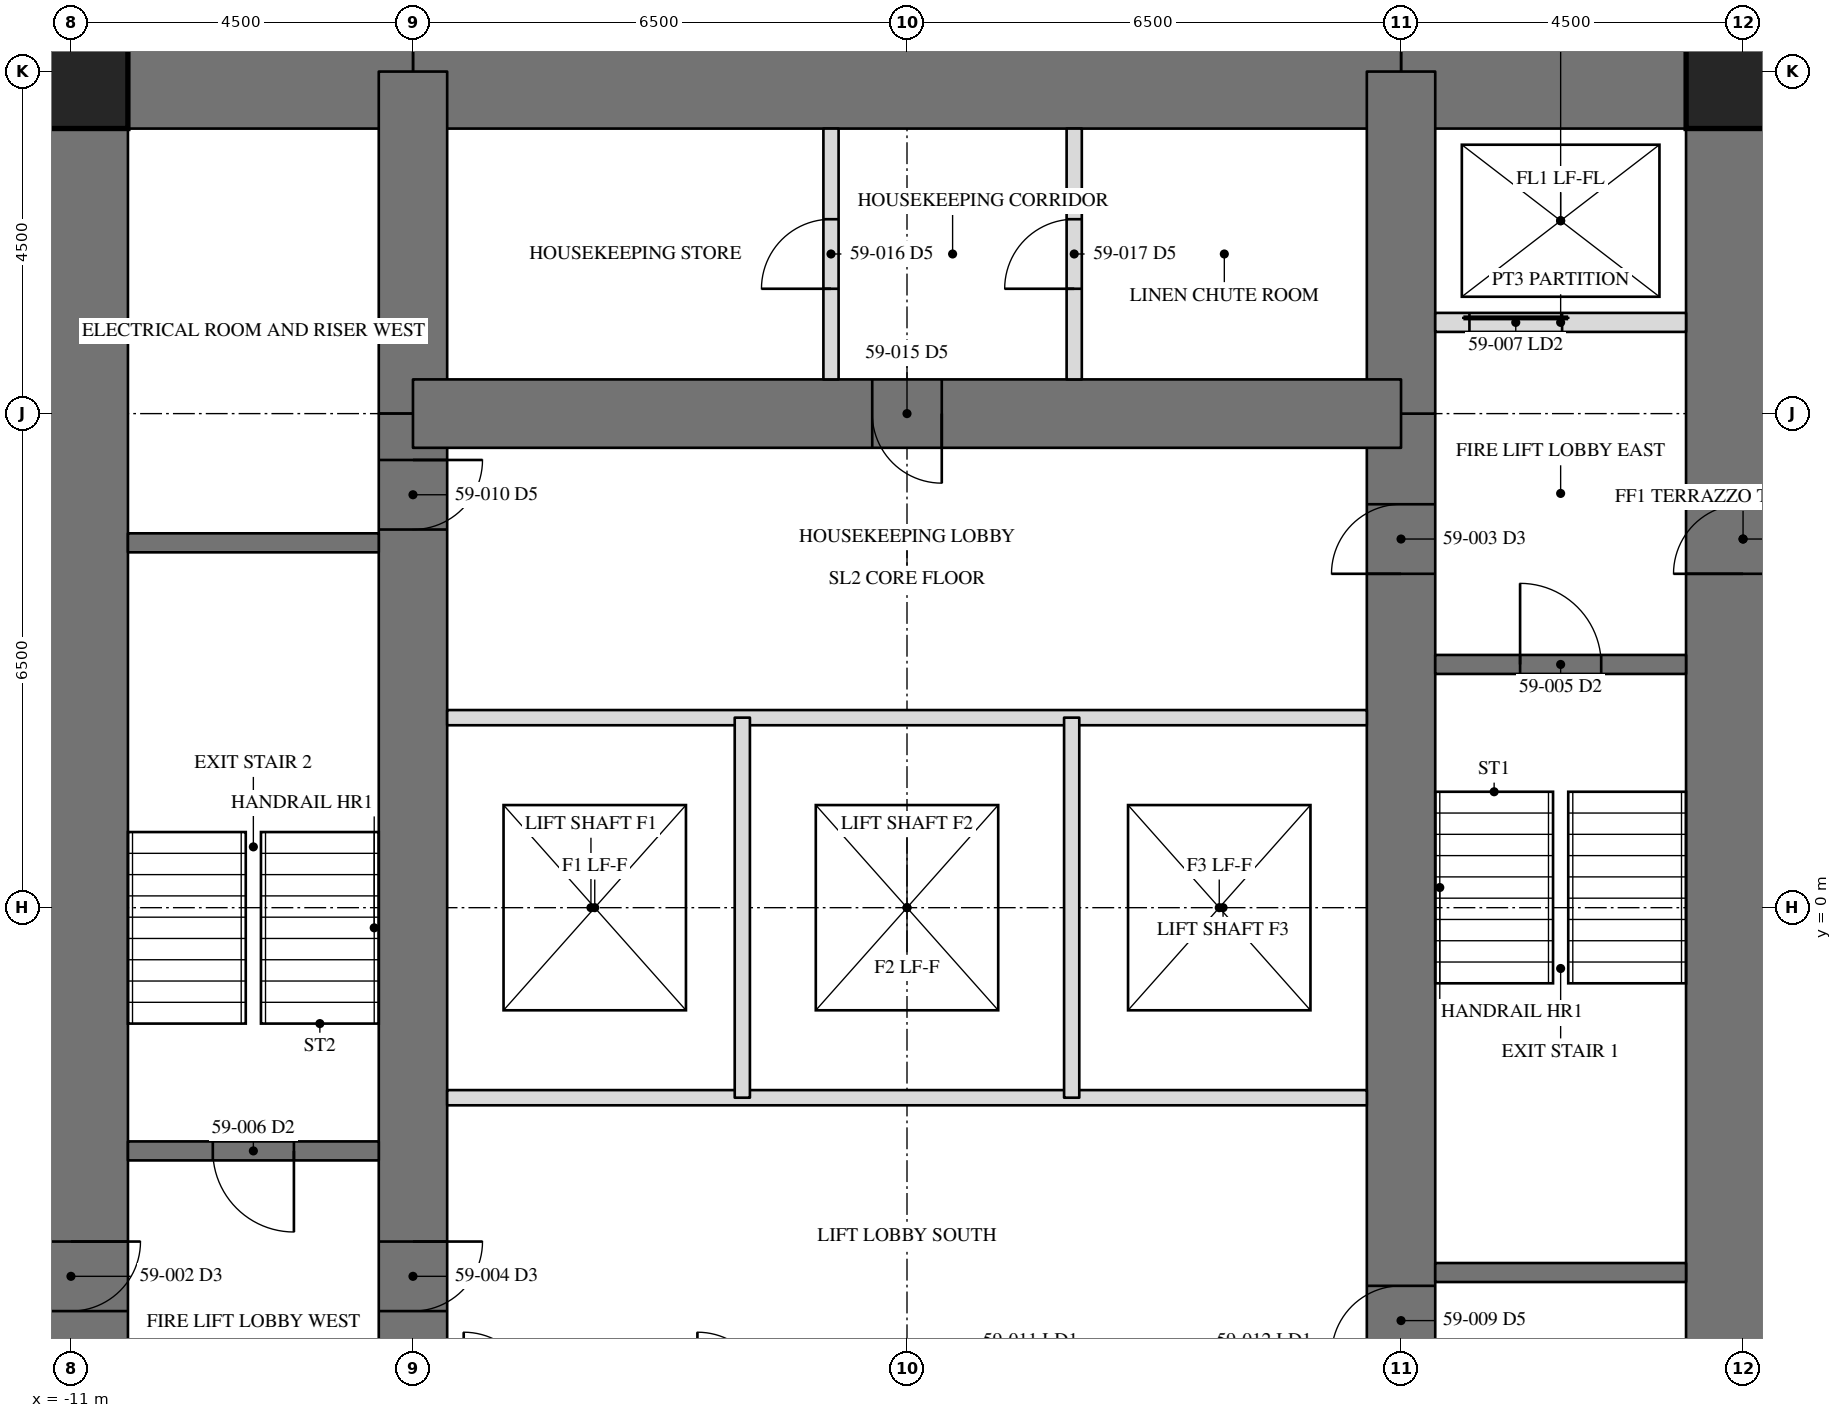
"""IFC4 building model, lengths in metres.
Left out: names, types, materials, properties, quantities, classifications, styles, units other than length and angle.
Written with IfcOpenShell. Run it as: python <this file> out.ifc"""

import sys

from ifc_helpers import new_model, si_unit, direction, frame, frame_2d, origin, origin_2d, place, context, subcontext, project, spatial, rectangle, hollow_rectangle, extrude, element, fill, save


model = new_model("IFC4")
c1 = context("Model", 3, precision=1e-05, world=origin(), true_north=direction((0.0, 1.0)))
c2 = subcontext(c1, "Body", "Model", "MODEL_VIEW")
j1 = project(units=[si_unit("LENGTHUNIT", "METRE"), si_unit("PLANEANGLEUNIT", "RADIAN")], contexts=[c1])
p1 = place(None, origin())
s1 = spatial("IfcSite", under=j1, at=p1, CompositionType="ELEMENT")
p2 = place(p1, origin())
s2 = spatial("IfcBuilding", under=s1, at=p2, CompositionType="ELEMENT")
p3 = place(p2, frame((0.0, 0.0, 243.2)))
s3 = spatial("IfcBuildingStorey", under=s2, at=p3, CompositionType="ELEMENT", Elevation=243.2)
p4 = place(p3, frame((11.0, -11.0, 0.0), z_axis=(0.0, 0.0, 1.0), x_axis=(0.0, 1.0, 0.0)))
e1 = element("IfcWall", 1, at=p4, inside=s3, PredefinedType="SHEAR", context=c2, shape_type="SweptSolid", body=[
    extrude(rectangle(XDim=22.0, YDim=1.5, at=frame_2d((11.0, 0.0))), origin(), (0.0, 0.0, 1.0), 3.5),
])
p5 = place(p4, frame((15.393, 0.0, 0.0)))
e2 = element("IfcOpeningElement", 2, at=p5, cuts=e1, PredefinedType="OPENING", context=c2, shape_type="SweptSolid", body=[
    extrude(rectangle(XDim=0.915, YDim=2.134, at=frame_2d((0.458, 1.067))), frame((0.0, 0.76, 0.0), z_axis=(0.0, -1.0, 0.0), x_axis=(1.0, 0.0, 0.0)), (0.0, 0.0, 1.0), 1.52),
])
p6 = place(p3, frame((-11.0, 11.0, 0.0), z_axis=(0.0, 0.0, 1.0), x_axis=(0.0, -1.0, 0.0)))
e3 = element("IfcWall", 3, at=p6, inside=s3, PredefinedType="SHEAR", context=c2, shape_type="SweptSolid", body=[
    extrude(rectangle(XDim=22.0, YDim=1.5, at=frame_2d((11.0, 0.0))), origin(), (0.0, 0.0, 1.0), 3.5),
])
p7 = place(p6, frame((15.393, 0.0, 0.0)))
e4 = element("IfcOpeningElement", 4, at=p7, cuts=e3, PredefinedType="OPENING", context=c2, shape_type="SweptSolid", body=[
    extrude(rectangle(XDim=0.915, YDim=2.134, at=frame_2d((0.458, 1.067))), frame((0.0, 0.76, 0.0), z_axis=(0.0, -1.0, 0.0), x_axis=(1.0, 0.0, 0.0)), (0.0, 0.0, 1.0), 1.52),
])
p8 = place(p3, frame((11.0, 11.0, 0.0), z_axis=(0.0, 0.0, 1.0), x_axis=(-1.0, 0.0, 0.0)))
e5 = element("IfcWall", 5, at=p8, inside=s3, PredefinedType="SHEAR", context=c2, shape_type="SweptSolid", body=[
    extrude(rectangle(XDim=4.5, YDim=1.5, at=frame_2d((2.25, 0.0))), origin(), (0.0, 0.0, 1.0), 3.5),
])
p9 = place(p3, frame((6.5, 11.0, 0.0), z_axis=(0.0, 0.0, 1.0), x_axis=(-1.0, 0.0, 0.0)))
e6 = element("IfcWall", 6, at=p9, inside=s3, PredefinedType="SHEAR", context=c2, shape_type="SweptSolid", body=[
    extrude(rectangle(XDim=13.0, YDim=1.5, at=frame_2d((6.5, 0.0))), origin(), (0.0, 0.0, 1.0), 3.5),
])
p10 = place(p3, frame((-6.5, 11.0, 0.0), z_axis=(0.0, 0.0, 1.0), x_axis=(-1.0, 0.0, 0.0)))
e7 = element("IfcWall", 7, at=p10, inside=s3, PredefinedType="SHEAR", context=c2, shape_type="SweptSolid", body=[
    extrude(rectangle(XDim=4.5, YDim=1.5, at=frame_2d((2.25, 0.0))), origin(), (0.0, 0.0, 1.0), 3.5),
])
p11 = place(p3, frame((6.5, -6.5, 0.0), z_axis=(0.0, 0.0, 1.0), x_axis=(0.0, 1.0, 0.0)))
e8 = element("IfcWall", 8, at=p11, inside=s3, PredefinedType="SHEAR", context=c2, shape_type="SweptSolid", body=[
    extrude(rectangle(XDim=13.0, YDim=0.9, at=frame_2d((6.5, 0.0))), origin(), (0.0, 0.0, 1.0), 3.5),
])
p12 = place(p11, frame((10.893, 0.0, 0.0)))
e9 = element("IfcOpeningElement", 9, at=p12, cuts=e8, PredefinedType="OPENING", context=c2, shape_type="SweptSolid", body=[
    extrude(rectangle(XDim=0.915, YDim=2.134, at=frame_2d((0.458, 1.067))), frame((0.0, 0.46, 0.0), z_axis=(0.0, -1.0, 0.0), x_axis=(1.0, 0.0, 0.0)), (0.0, 0.0, 1.0), 0.92),
])
p13 = place(p11, frame((0.61, 0.0, 0.0)))
e10 = element("IfcOpeningElement", 10, at=p13, cuts=e8, PredefinedType="OPENING", context=c2, shape_type="SweptSolid", body=[
    extrude(rectangle(XDim=0.915, YDim=2.134, at=frame_2d((0.458, 1.067))), frame((0.0, 0.46, 0.0), z_axis=(0.0, -1.0, 0.0), x_axis=(1.0, 0.0, 0.0)), (0.0, 0.0, 1.0), 0.92),
])
for number, where, z_axis, x_axis in (
    (11, (6.5, 6.5, 0.0), (0.0, 0.0, 1.0), (0.0, 1.0, 0.0)),
    (12, (-6.5, 11.0, 0.0), (0.0, 0.0, 1.0), (0.0, -1.0, 0.0)),
):
    element("IfcWall", number, at=place(p3, frame(where, z_axis=z_axis, x_axis=x_axis)), inside=s3, PredefinedType="SHEAR", context=c2, shape_type="SweptSolid", body=[
        extrude(rectangle(XDim=4.5, YDim=0.9, at=frame_2d((2.25, 0.0))), origin(), (0.0, 0.0, 1.0), 3.5),
    ])
p14 = place(p3, frame((-6.5, 6.5, 0.0), z_axis=(0.0, 0.0, 1.0), x_axis=(0.0, -1.0, 0.0)))
e13 = element("IfcWall", 13, at=p14, inside=s3, PredefinedType="SHEAR", context=c2, shape_type="SweptSolid", body=[
    extrude(rectangle(XDim=13.0, YDim=0.9, at=frame_2d((6.5, 0.0))), origin(), (0.0, 0.0, 1.0), 3.5),
])
p15 = place(p14, frame((10.893, 0.0, 0.0)))
e14 = element("IfcOpeningElement", 14, at=p15, cuts=e13, PredefinedType="OPENING", context=c2, shape_type="SweptSolid", body=[
    extrude(rectangle(XDim=0.915, YDim=2.134, at=frame_2d((0.458, 1.067))), frame((0.0, 0.46, 0.0), z_axis=(0.0, -1.0, 0.0), x_axis=(1.0, 0.0, 0.0)), (0.0, 0.0, 1.0), 0.92),
])
p16 = place(p14, frame((0.61, 0.0, 0.0)))
e15 = element("IfcOpeningElement", 15, at=p16, cuts=e13, PredefinedType="OPENING", context=c2, shape_type="SweptSolid", body=[
    extrude(rectangle(XDim=0.915, YDim=2.134, at=frame_2d((0.458, 1.067))), frame((0.0, 0.46, 0.0), z_axis=(0.0, -1.0, 0.0), x_axis=(1.0, 0.0, 0.0)), (0.0, 0.0, 1.0), 0.92),
])
p17 = place(p3, frame((6.5, 6.5, 0.0), z_axis=(0.0, 0.0, 1.0), x_axis=(-1.0, 0.0, 0.0)))
e16 = element("IfcWall", 16, at=p17, inside=s3, PredefinedType="SHEAR", context=c2, shape_type="SweptSolid", body=[
    extrude(rectangle(XDim=13.0, YDim=0.9, at=frame_2d((6.5, 0.0))), origin(), (0.0, 0.0, 1.0), 3.5),
])
p18 = place(p17, frame((6.042, 0.0, 0.0)))
e17 = element("IfcOpeningElement", 17, at=p18, cuts=e16, PredefinedType="OPENING", context=c2, shape_type="SweptSolid", body=[
    extrude(rectangle(XDim=0.915, YDim=2.134, at=frame_2d((0.458, 1.067))), frame((0.0, 0.46, 0.0), z_axis=(0.0, -1.0, 0.0), x_axis=(1.0, 0.0, 0.0)), (0.0, 0.0, 1.0), 0.92),
])
for number, where, z_axis, x_axis in (
    (18, (11.0, 11.0, 0.0), (0.0, 0.0, 1.0), (1.0, 0.0, 0.0)),
    (19, (-11.0, 11.0, 0.0), (0.0, 0.0, 1.0), (1.0, 0.0, 0.0)),
):
    element("IfcColumn", number, at=place(p3, frame(where, z_axis=z_axis, x_axis=x_axis)), inside=s3, PredefinedType="COLUMN", context=c2, shape_type="SweptSolid", body=[
        extrude(hollow_rectangle(XDim=1.499, YDim=1.499, WallThickness=0.102, at=origin_2d()), origin(), (0.0, 0.0, 1.0), 3.5),
    ])
for number, where, z_axis, x_axis in (
    (20, (6.95, -4.8, 0.0), (0.0, 0.0, 1.0), (1.0, 0.0, 0.0)),
    (21, (-6.95, 4.8, 0.0), (0.0, 0.0, 1.0), (-1.0, 0.0, 0.0)),
):
    element("IfcWall", number, at=place(p3, frame(where, z_axis=z_axis, x_axis=x_axis)), inside=s3, PredefinedType="SOLIDWALL", context=c2, shape_type="SweptSolid", body=[
        extrude(rectangle(XDim=3.3, YDim=0.25, at=frame_2d((1.65, 0.0))), origin(), (0.0, 0.0, 1.0), 3.31),
    ])
p19 = place(p3, frame((6.95, 3.2, 0.0), z_axis=(0.0, 0.0, 1.0), x_axis=(1.0, 0.0, 0.0)))
e22 = element("IfcWall", 22, at=p19, inside=s3, PredefinedType="SOLIDWALL", context=c2, shape_type="SweptSolid", body=[
    extrude(rectangle(XDim=3.3, YDim=0.25, at=frame_2d((1.65, 0.0))), origin(), (0.0, 0.0, 1.0), 3.31),
])
p20 = place(p19, frame((1.116, 0.0, 0.0)))
e23 = element("IfcOpeningElement", 23, at=p20, cuts=e22, PredefinedType="OPENING", context=c2, shape_type="SweptSolid", body=[
    extrude(rectangle(XDim=1.067, YDim=2.134, at=frame_2d((0.533, 1.067))), frame((0.0, 0.135, 0.0), z_axis=(0.0, -1.0, 0.0), x_axis=(1.0, 0.0, 0.0)), (0.0, 0.0, 1.0), 0.27),
])
p21 = place(p3, frame((-6.95, -3.2, 0.0), z_axis=(0.0, 0.0, 1.0), x_axis=(-1.0, 0.0, 0.0)))
e24 = element("IfcWall", 24, at=p21, inside=s3, PredefinedType="SOLIDWALL", context=c2, shape_type="SweptSolid", body=[
    extrude(rectangle(XDim=3.3, YDim=0.25, at=frame_2d((1.65, 0.0))), origin(), (0.0, 0.0, 1.0), 3.31),
])
p22 = place(p21, frame((1.116, 0.0, 0.0)))
e25 = element("IfcOpeningElement", 25, at=p22, cuts=e24, PredefinedType="OPENING", context=c2, shape_type="SweptSolid", body=[
    extrude(rectangle(XDim=1.067, YDim=2.134, at=frame_2d((0.533, 1.067))), frame((0.0, 0.135, 0.0), z_axis=(0.0, -1.0, 0.0), x_axis=(1.0, 0.0, 0.0)), (0.0, 0.0, 1.0), 0.27),
])
p23 = place(p3, frame((6.95, 7.7, 0.0), z_axis=(0.0, 0.0, 1.0), x_axis=(1.0, 0.0, 0.0)))
e26 = element("IfcWall", 26, at=p23, inside=s3, PredefinedType="PARTITIONING", context=c2, shape_type="SweptSolid", body=[
    extrude(rectangle(XDim=3.3, YDim=0.25, at=frame_2d((1.65, 0.0))), origin(), (0.0, 0.0, 1.0), 3.31),
])
p24 = place(p23, frame((0.45, 0.0, 0.0)))
e27 = element("IfcOpeningElement", 27, at=p24, cuts=e26, PredefinedType="OPENING", context=c2, shape_type="SweptSolid", body=[
    extrude(rectangle(XDim=1.219, YDim=2.134, at=frame_2d((0.609, 1.067))), frame((0.0, 0.135, 0.0), z_axis=(0.0, -1.0, 0.0), x_axis=(1.0, 0.0, 0.0)), (0.0, 0.0, 1.0), 0.27),
])
for number, where, z_axis, x_axis in (
    (28, (-6.05, 2.5, 0.0), (0.0, 0.0, 1.0), (1.0, 0.0, 0.0)),
    (29, (6.05, -2.5, 0.0), (0.0, 0.0, 1.0), (-1.0, 0.0, 0.0)),
):
    element("IfcWall", number, at=place(p3, frame(where, z_axis=z_axis, x_axis=x_axis)), inside=s3, PredefinedType="PARTITIONING", context=c2, shape_type="SweptSolid", body=[
        extrude(rectangle(XDim=12.1, YDim=0.2, at=frame_2d((6.05, 0.0))), origin(), (0.0, 0.0, 1.0), 3.31),
    ])
for number, where, z_axis, x_axis in (
    (30, (-2.167, -2.5, 0.0), (0.0, 0.0, 1.0), (0.0, 1.0, 0.0)),
    (31, (2.167, -2.5, 0.0), (0.0, 0.0, 1.0), (0.0, 1.0, 0.0)),
):
    element("IfcWall", number, at=place(p3, frame(where, z_axis=z_axis, x_axis=x_axis)), inside=s3, PredefinedType="PARTITIONING", context=c2, shape_type="SweptSolid", body=[
        extrude(rectangle(XDim=5.0, YDim=0.2, at=frame_2d((2.5, 0.0))), origin(), (0.0, 0.0, 1.0), 3.31),
    ])
p25 = place(p3, frame((-1.0, 6.95, 0.0), z_axis=(0.0, 0.0, 1.0), x_axis=(0.0, 1.0, 0.0)))
e32 = element("IfcWall", 32, at=p25, inside=s3, PredefinedType="PARTITIONING", context=c2, shape_type="SweptSolid", body=[
    extrude(rectangle(XDim=3.3, YDim=0.2, at=frame_2d((1.65, 0.0))), origin(), (0.0, 0.0, 1.0), 3.31),
])
p26 = place(p25, frame((1.192, 0.0, 0.0)))
e33 = element("IfcOpeningElement", 33, at=p26, cuts=e32, PredefinedType="OPENING", context=c2, shape_type="SweptSolid", body=[
    extrude(rectangle(XDim=0.915, YDim=2.134, at=frame_2d((0.458, 1.067))), frame((0.0, 0.11, 0.0), z_axis=(0.0, -1.0, 0.0), x_axis=(1.0, 0.0, 0.0)), (0.0, 0.0, 1.0), 0.22),
])
p27 = place(p3, frame((2.2, 6.95, 0.0), z_axis=(0.0, 0.0, 1.0), x_axis=(0.0, 1.0, 0.0)))
e34 = element("IfcWall", 34, at=p27, inside=s3, PredefinedType="PARTITIONING", context=c2, shape_type="SweptSolid", body=[
    extrude(rectangle(XDim=3.3, YDim=0.2, at=frame_2d((1.65, 0.0))), origin(), (0.0, 0.0, 1.0), 3.31),
])
p28 = place(p27, frame((1.192, 0.0, 0.0)))
e35 = element("IfcOpeningElement", 35, at=p28, cuts=e34, PredefinedType="OPENING", context=c2, shape_type="SweptSolid", body=[
    extrude(rectangle(XDim=0.915, YDim=2.134, at=frame_2d((0.458, 1.067))), frame((0.0, 0.11, 0.0), z_axis=(0.0, -1.0, 0.0), x_axis=(1.0, 0.0, 0.0)), (0.0, 0.0, 1.0), 0.22),
])
p29 = place(p12, origin())
e36 = element("IfcDoor", 36, at=p29, inside=s3, OperationType="SINGLE_SWING_RIGHT", PredefinedType="DOOR", context=c2, shape_type="SweptSolid", body=[
    extrude(rectangle(XDim=0.915, YDim=2.134, at=frame_2d((0.458, 1.067))), frame((0.0, -0.375, 0.0), z_axis=(0.0, -1.0, 0.0), x_axis=(1.0, 0.0, 0.0)), (0.0, 0.0, 1.0), 0.05),
])
fill(e9, e36)
p30 = place(p15, origin())
e37 = element("IfcDoor", 37, at=p30, inside=s3, OperationType="SINGLE_SWING_RIGHT", PredefinedType="DOOR", context=c2, shape_type="SweptSolid", body=[
    extrude(rectangle(XDim=0.915, YDim=2.134, at=frame_2d((0.458, 1.067))), frame((0.0, -0.375, 0.0), z_axis=(0.0, -1.0, 0.0), x_axis=(1.0, 0.0, 0.0)), (0.0, 0.0, 1.0), 0.05),
])
fill(e14, e37)
p31 = place(p20, origin())
e38 = element("IfcDoor", 38, at=p31, inside=s3, OperationType="SINGLE_SWING_LEFT", PredefinedType="DOOR", context=c2, shape_type="SweptSolid", body=[
    extrude(rectangle(XDim=1.067, YDim=2.134, at=frame_2d((0.533, 1.067))), frame((0.0, 0.025, 0.0), z_axis=(0.0, -1.0, 0.0), x_axis=(1.0, 0.0, 0.0)), (0.0, 0.0, 1.0), 0.05),
])
fill(e23, e38)
p32 = place(p22, origin())
e39 = element("IfcDoor", 39, at=p32, inside=s3, OperationType="SINGLE_SWING_LEFT", PredefinedType="DOOR", context=c2, shape_type="SweptSolid", body=[
    extrude(rectangle(XDim=1.067, YDim=2.134, at=frame_2d((0.533, 1.067))), frame((0.0, 0.025, 0.0), z_axis=(0.0, -1.0, 0.0), x_axis=(1.0, 0.0, 0.0)), (0.0, 0.0, 1.0), 0.05),
])
fill(e25, e39)
p33 = place(p24, origin())
e40 = element("IfcDoor", 40, at=p33, inside=s3, OperationType="SLIDING_TO_LEFT", PredefinedType="DOOR", context=c2, shape_type="SweptSolid", body=[
    extrude(rectangle(XDim=1.219, YDim=2.134, at=frame_2d((0.609, 1.067))), frame((0.0, 0.025, 0.0), z_axis=(0.0, -1.0, 0.0), x_axis=(1.0, 0.0, 0.0)), (0.0, 0.0, 1.0), 0.05),
])
fill(e27, e40)
p34 = place(p13, origin())
e41 = element("IfcDoor", 41, at=p34, inside=s3, OperationType="SINGLE_SWING_RIGHT", PredefinedType="DOOR", context=c2, shape_type="SweptSolid", body=[
    extrude(rectangle(XDim=0.915, YDim=2.134, at=frame_2d((0.458, 1.067))), frame((0.0, -0.375, 0.0), z_axis=(0.0, -1.0, 0.0), x_axis=(1.0, 0.0, 0.0)), (0.0, 0.0, 1.0), 0.05),
])
fill(e10, e41)
p35 = place(p16, origin())
e42 = element("IfcDoor", 42, at=p35, inside=s3, OperationType="SINGLE_SWING_RIGHT", PredefinedType="DOOR", context=c2, shape_type="SweptSolid", body=[
    extrude(rectangle(XDim=0.915, YDim=2.134, at=frame_2d((0.458, 1.067))), frame((0.0, -0.375, 0.0), z_axis=(0.0, -1.0, 0.0), x_axis=(1.0, 0.0, 0.0)), (0.0, 0.0, 1.0), 0.05),
])
fill(e15, e42)
p36 = place(p18, origin())
e43 = element("IfcDoor", 43, at=p36, inside=s3, OperationType="SINGLE_SWING_RIGHT", PredefinedType="DOOR", context=c2, shape_type="SweptSolid", body=[
    extrude(rectangle(XDim=0.915, YDim=2.134, at=frame_2d((0.458, 1.067))), frame((0.0, -0.375, 0.0), z_axis=(0.0, -1.0, 0.0), x_axis=(1.0, 0.0, 0.0)), (0.0, 0.0, 1.0), 0.05),
])
fill(e17, e43)
p37 = place(p26, origin())
e44 = element("IfcDoor", 44, at=p37, inside=s3, OperationType="SINGLE_SWING_RIGHT", PredefinedType="DOOR", context=c2, shape_type="SweptSolid", body=[
    extrude(rectangle(XDim=0.915, YDim=2.134, at=frame_2d((0.458, 1.067))), frame((0.0, 0.025, 0.0), z_axis=(0.0, -1.0, 0.0), x_axis=(1.0, 0.0, 0.0)), (0.0, 0.0, 1.0), 0.05),
])
fill(e33, e44)
p38 = place(p28, origin())
e45 = element("IfcDoor", 45, at=p38, inside=s3, OperationType="SINGLE_SWING_RIGHT", PredefinedType="DOOR", context=c2, shape_type="SweptSolid", body=[
    extrude(rectangle(XDim=0.915, YDim=2.134, at=frame_2d((0.458, 1.067))), frame((0.0, 0.025, 0.0), z_axis=(0.0, -1.0, 0.0), x_axis=(1.0, 0.0, 0.0)), (0.0, 0.0, 1.0), 0.05),
])
fill(e35, e45)
save(model, sys.argv[1])
